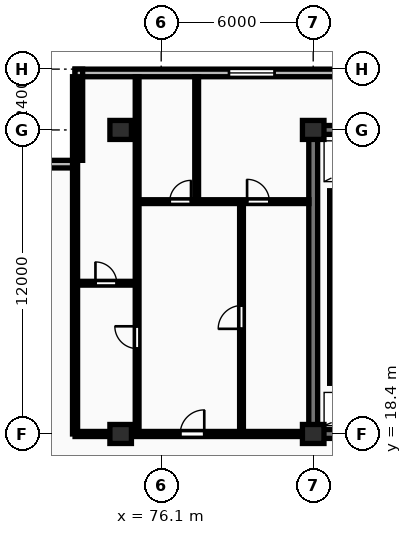
"""IFC4 building model, lengths in metres.
Left out: names, types, materials, properties, quantities, classifications, styles, units other than length and angle.
Written with IfcOpenShell. Run it as: python <this file> out.ifc"""

import sys

from ifc_helpers import new_model, si_unit, direction, frame, frame_2d, origin, origin_2d, place, context, subcontext, project, spatial, rectangle, extrude, element, fill, save


model = new_model("IFC4")
c1 = context("Model", 3, precision=1e-05, world=origin(), true_north=direction((0.0, 1.0)))
c2 = subcontext(c1, "Body", "Model", "MODEL_VIEW")
j1 = project(units=[si_unit("LENGTHUNIT", "METRE"), si_unit("PLANEANGLEUNIT", "RADIAN")], contexts=[c1])
p1 = place(None, origin())
s1 = spatial("IfcSite", under=j1, at=p1, CompositionType="ELEMENT")
p2 = place(p1, origin())
s2 = spatial("IfcBuilding", under=s1, at=p2, CompositionType="ELEMENT")
p3 = place(p2, frame((0.0, 0.0, 100.3)))
s3 = spatial("IfcBuildingStorey", under=s2, at=p3, CompositionType="ELEMENT", Elevation=100.3)
for number, where, z_axis, x_axis in (
    (1, (74.5, 18.4, 0.0), (0.0, 0.0, 1.0), (1.0, 0.0, 0.0)),
    (2, (74.5, 30.4, 0.0), (0.0, 0.0, 1.0), (1.0, 0.0, 0.0)),
    (3, (82.1, 18.4, 0.0), (0.0, 0.0, 1.0), (1.0, 0.0, 0.0)),
    (4, (82.1, 30.4, 0.0), (0.0, 0.0, 1.0), (1.0, 0.0, 0.0)),
):
    element("IfcColumn", number, at=place(p3, frame(where, z_axis=z_axis, x_axis=x_axis)), inside=s3, PredefinedType="COLUMN", context=c2, shape_type="SweptSolid", body=[
        extrude(rectangle(XDim=0.85, YDim=0.75, at=origin_2d()), origin(), (0.0, 0.0, 1.0), 3.25),
    ])
p4 = place(p3, frame((130.7, 32.65, 0.0), z_axis=(0.0, 0.0, 1.0), x_axis=(-1.0, 0.0, 0.0)))
e5 = element("IfcWall", 5, at=p4, inside=s3, PredefinedType="STANDARD", context=c2, shape_type="SweptSolid", body=[
    extrude(rectangle(XDim=58.0, YDim=0.3, at=frame_2d((29.0, 0.0))), origin(), (0.0, 0.0, 1.0), 2.97),
])
p5 = place(p4, frame((50.125, 0.0, 0.85)))
e6 = element("IfcOpeningElement", 6, at=p5, cuts=e5, PredefinedType="OPENING", context=c2, shape_type="SweptSolid", body=[
    extrude(rectangle(XDim=1.8, YDim=1.8, at=frame_2d((0.9, 0.9))), frame((0.0, 0.16, 0.0), z_axis=(0.0, -1.0, 0.0), x_axis=(1.0, 0.0, 0.0)), (0.0, 0.0, 1.0), 0.32),
])
p6 = place(p4, frame((6.775, 0.0, 0.85)))
e7 = element("IfcOpeningElement", 7, at=p6, cuts=e5, PredefinedType="OPENING", context=c2, shape_type="SweptSolid", body=[
    extrude(rectangle(XDim=1.8, YDim=1.8, at=frame_2d((0.9, 0.9))), frame((0.0, 0.16, 0.0), z_axis=(0.0, -1.0, 0.0), x_axis=(1.0, 0.0, 0.0)), (0.0, 0.0, 1.0), 0.32),
])
p7 = place(p3, frame((72.85, 32.8, 0.0), z_axis=(0.0, 0.0, 1.0), x_axis=(0.0, -1.0, 0.0)))
e8 = element("IfcWall", 8, at=p7, inside=s3, PredefinedType="STANDARD", context=c2, shape_type="SweptSolid", body=[
    extrude(rectangle(XDim=3.6, YDim=0.3, at=frame_2d((1.8, 0.0))), origin(), (0.0, 0.0, 1.0), 2.97),
])
p8 = place(p3, frame((72.7, 29.05, 0.0), z_axis=(0.0, 0.0, 1.0), x_axis=(-1.0, 0.0, 0.0)))
e9 = element("IfcWall", 9, at=p8, inside=s3, PredefinedType="STANDARD", context=c2, shape_type="SweptSolid", body=[
    extrude(rectangle(XDim=3.6, YDim=0.3, at=frame_2d((1.8, 0.0))), origin(), (0.0, 0.0, 1.0), 2.97),
])
p9 = place(p3, frame((81.925, 30.4, 0.0), z_axis=(0.0, 0.0, 1.0), x_axis=(1.0, 0.0, 0.0)))
e10 = element("IfcWall", 10, at=p9, inside=s3, PredefinedType="SHEAR", context=c2, shape_type="SweptSolid", body=[
    extrude(rectangle(XDim=36.265, YDim=0.35, at=frame_2d((18.132, 0.0))), origin(), (0.0, 0.0, 1.0), 3.25),
])
p10 = place(p3, frame((82.1, 18.575, 0.0), z_axis=(0.0, 0.0, 1.0), x_axis=(0.0, 1.0, 0.0)))
e11 = element("IfcWall", 11, at=p10, inside=s3, PredefinedType="SHEAR", context=c2, shape_type="SweptSolid", body=[
    extrude(rectangle(XDim=11.65, YDim=0.35, at=frame_2d((5.825, 0.0))), origin(), (0.0, 0.0, 1.0), 3.25),
])
p11 = place(p3, frame((81.925, 18.4, 0.0), z_axis=(0.0, 0.0, 1.0), x_axis=(1.0, 0.0, 0.0)))
e12 = element("IfcWall", 12, at=p11, inside=s3, PredefinedType="SHEAR", context=c2, shape_type="SweptSolid", body=[
    extrude(rectangle(XDim=36.265, YDim=0.35, at=frame_2d((18.132, 0.0))), origin(), (0.0, 0.0, 1.0), 3.25),
])
p12 = place(p11, frame((5.675, 0.0, 0.0)))
e13 = element("IfcOpeningElement", 13, at=p12, cuts=e12, PredefinedType="OPENING", context=c2, shape_type="SweptSolid", body=[
    extrude(rectangle(XDim=1.0, YDim=2.15, at=frame_2d((0.5, 1.075))), frame((0.0, 0.185, 0.0), z_axis=(0.0, -1.0, 0.0), x_axis=(1.0, 0.0, 0.0)), (0.0, 0.0, 1.0), 0.37),
])
p13 = place(p11, frame((21.925, 0.0, 0.0)))
e14 = element("IfcOpeningElement", 14, at=p13, cuts=e12, PredefinedType="OPENING", context=c2, shape_type="SweptSolid", body=[
    extrude(rectangle(XDim=1.5, YDim=2.2, at=frame_2d((0.75, 1.1))), frame((0.0, 0.185, 0.0), z_axis=(0.0, -1.0, 0.0), x_axis=(1.0, 0.0, 0.0)), (0.0, 0.0, 1.0), 0.37),
])
p14 = place(p11, frame((29.875, 0.0, 0.0)))
e15 = element("IfcOpeningElement", 15, at=p14, cuts=e12, PredefinedType="OPENING", context=c2, shape_type="SweptSolid", body=[
    extrude(rectangle(XDim=1.0, YDim=2.15, at=frame_2d((0.5, 1.075))), frame((0.0, 0.185, 0.0), z_axis=(0.0, -1.0, 0.0), x_axis=(1.0, 0.0, 0.0)), (0.0, 0.0, 1.0), 0.37),
])
p15 = place(p3, frame((82.875, 20.4, 0.0), z_axis=(0.0, 0.0, 1.0), x_axis=(0.0, 1.0, 0.0)))
e16 = element("IfcWall", 16, at=p15, inside=s3, PredefinedType="SHEAR", context=c2, shape_type="SweptSolid", body=[
    extrude(rectangle(XDim=7.6, YDim=0.25, at=frame_2d((3.8, 0.0))), origin(), (0.0, 0.0, 1.0), 3.25),
])
p16 = place(p3, frame((72.7, 18.4, 0.0), z_axis=(0.0, 0.0, 1.0), x_axis=(0.0, 1.0, 0.0)))
e17 = element("IfcWall", 17, at=p16, inside=s3, PredefinedType="PARTITIONING", context=c2, shape_type="SweptSolid", body=[
    extrude(rectangle(XDim=14.1, YDim=0.2, at=frame_2d((7.05, 0.0))), origin(), (0.0, 0.0, 1.0), 2.97),
])
p17 = place(p3, frame((72.7, 24.35, 0.0), z_axis=(0.0, 0.0, 1.0), x_axis=(1.0, 0.0, 0.0)))
e18 = element("IfcWall", 18, at=p17, inside=s3, PredefinedType="PARTITIONING", context=c2, shape_type="SweptSolid", body=[
    extrude(rectangle(XDim=2.45, YDim=0.15, at=frame_2d((1.225, 0.0))), origin(), (0.0, 0.0, 1.0), 2.97),
])
p18 = place(p17, frame((0.805, 0.0, 0.0)))
e19 = element("IfcOpeningElement", 19, at=p18, cuts=e18, PredefinedType="OPENING", context=c2, shape_type="SweptSolid", body=[
    extrude(rectangle(XDim=0.84, YDim=2.04, at=frame_2d((0.42, 1.02))), frame((0.0, 0.085, 0.0), z_axis=(0.0, -1.0, 0.0), x_axis=(1.0, 0.0, 0.0)), (0.0, 0.0, 1.0), 0.17),
])
p19 = place(p3, frame((75.15, 18.45, 0.0), z_axis=(0.0, 0.0, 1.0), x_axis=(0.0, 1.0, 0.0)))
e20 = element("IfcWall", 20, at=p19, inside=s3, PredefinedType="PARTITIONING", context=c2, shape_type="SweptSolid", body=[
    extrude(rectangle(XDim=14.05, YDim=0.15, at=frame_2d((7.025, 0.0))), origin(), (0.0, 0.0, 1.0), 2.97),
])
p20 = place(p19, frame((3.32, 0.0, 0.0)))
e21 = element("IfcOpeningElement", 21, at=p20, cuts=e20, PredefinedType="OPENING", context=c2, shape_type="SweptSolid", body=[
    extrude(rectangle(XDim=0.88, YDim=2.06, at=frame_2d((0.44, 1.03))), frame((0.0, 0.085, 0.0), z_axis=(0.0, -1.0, 0.0), x_axis=(1.0, 0.0, 0.0)), (0.0, 0.0, 1.0), 0.17),
])
p21 = place(p3, frame((79.27, 18.45, 0.0), z_axis=(0.0, 0.0, 1.0), x_axis=(0.0, 1.0, 0.0)))
e22 = element("IfcWall", 22, at=p21, inside=s3, PredefinedType="PARTITIONING", context=c2, shape_type="SweptSolid", body=[
    extrude(rectangle(XDim=9.12, YDim=0.15, at=frame_2d((4.56, 0.0))), origin(), (0.0, 0.0, 1.0), 2.97),
])
p22 = place(p21, frame((4.1, 0.0, 0.0)))
e23 = element("IfcOpeningElement", 23, at=p22, cuts=e22, PredefinedType="OPENING", context=c2, shape_type="SweptSolid", body=[
    extrude(rectangle(XDim=0.92, YDim=2.08, at=frame_2d((0.46, 1.04))), frame((0.0, 0.085, 0.0), z_axis=(0.0, -1.0, 0.0), x_axis=(1.0, 0.0, 0.0)), (0.0, 0.0, 1.0), 0.17),
])
p23 = place(p3, frame((77.5, 27.57, 0.0), z_axis=(0.0, 0.0, 1.0), x_axis=(0.0, 1.0, 0.0)))
e24 = element("IfcWall", 24, at=p23, inside=s3, PredefinedType="PARTITIONING", context=c2, shape_type="SweptSolid", body=[
    extrude(rectangle(XDim=4.93, YDim=0.15, at=frame_2d((2.465, 0.0))), origin(), (0.0, 0.0, 1.0), 2.97),
])
p24 = place(p3, frame((75.17, 27.57, 0.0), z_axis=(0.0, 0.0, 1.0), x_axis=(1.0, 0.0, 0.0)))
e25 = element("IfcWall", 25, at=p24, inside=s3, PredefinedType="PARTITIONING", context=c2, shape_type="SweptSolid", body=[
    extrude(rectangle(XDim=6.76, YDim=0.15, at=frame_2d((3.38, 0.0))), origin(), (0.0, 0.0, 1.0), 2.97),
])
p25 = place(p24, frame((1.266, 0.0, 0.0)))
e26 = element("IfcOpeningElement", 26, at=p25, cuts=e25, PredefinedType="OPENING", context=c2, shape_type="SweptSolid", body=[
    extrude(rectangle(XDim=0.84, YDim=2.04, at=frame_2d((0.42, 1.02))), frame((0.0, 0.085, 0.0), z_axis=(0.0, -1.0, 0.0), x_axis=(1.0, 0.0, 0.0)), (0.0, 0.0, 1.0), 0.17),
])
p26 = place(p24, frame((4.32, 0.0, 0.0)))
e27 = element("IfcOpeningElement", 27, at=p26, cuts=e25, PredefinedType="OPENING", context=c2, shape_type="SweptSolid", body=[
    extrude(rectangle(XDim=0.88, YDim=2.06, at=frame_2d((0.44, 1.03))), frame((0.0, 0.085, 0.0), z_axis=(0.0, -1.0, 0.0), x_axis=(1.0, 0.0, 0.0)), (0.0, 0.0, 1.0), 0.17),
])
p27 = place(p3, frame((72.7, 18.4, 0.0), z_axis=(0.0, 0.0, 1.0), x_axis=(1.0, 0.0, 0.0)))
e28 = element("IfcWall", 28, at=p27, inside=s3, PredefinedType="PARTITIONING", context=c2, shape_type="SweptSolid", body=[
    extrude(rectangle(XDim=9.25, YDim=0.2, at=frame_2d((4.625, 0.0))), origin(), (0.0, 0.0, 1.0), 2.358),
])
p28 = place(p27, frame((4.15, 0.0, 0.0)))
e29 = element("IfcOpeningElement", 29, at=p28, cuts=e28, PredefinedType="OPENING", context=c2, shape_type="SweptSolid", body=[
    extrude(rectangle(XDim=0.95, YDim=2.15, at=frame_2d((0.475, 1.075))), frame((0.0, 0.11, 0.0), z_axis=(0.0, -1.0, 0.0), x_axis=(1.0, 0.0, 0.0)), (0.0, 0.0, 1.0), 0.22),
])
p29 = place(p5, origin())
e30 = element("IfcWindow", 30, at=p29, inside=s3, PartitioningType="SINGLE_PANEL", PredefinedType="WINDOW", context=c2, shape_type="SweptSolid", body=[
    extrude(rectangle(XDim=1.8, YDim=1.8, at=frame_2d((0.9, 0.9))), frame((0.0, 0.03, 0.0), z_axis=(0.0, -1.0, 0.0), x_axis=(1.0, 0.0, 0.0)), (0.0, 0.0, 1.0), 0.06),
])
fill(e6, e30)
p30 = place(p18, origin())
e31 = element("IfcDoor", 31, at=p30, inside=s3, OperationType="SINGLE_SWING_LEFT", PredefinedType="DOOR", context=c2, shape_type="SweptSolid", body=[
    extrude(rectangle(XDim=0.84, YDim=2.04, at=frame_2d((0.42, 1.02))), frame((0.0, 0.025, 0.0), z_axis=(0.0, -1.0, 0.0), x_axis=(1.0, 0.0, 0.0)), (0.0, 0.0, 1.0), 0.05),
])
fill(e19, e31)
p31 = place(p20, origin())
e32 = element("IfcDoor", 32, at=p31, inside=s3, OperationType="SINGLE_SWING_RIGHT", PredefinedType="DOOR", context=c2, shape_type="SweptSolid", body=[
    extrude(rectangle(XDim=0.88, YDim=2.06, at=frame_2d((0.44, 1.03))), frame((0.0, 0.025, 0.0), z_axis=(0.0, -1.0, 0.0), x_axis=(1.0, 0.0, 0.0)), (0.0, 0.0, 1.0), 0.05),
])
fill(e21, e32)
p32 = place(p22, origin())
e33 = element("IfcDoor", 33, at=p32, inside=s3, OperationType="SINGLE_SWING_LEFT", PredefinedType="DOOR", context=c2, shape_type="SweptSolid", body=[
    extrude(rectangle(XDim=0.92, YDim=2.08, at=frame_2d((0.46, 1.04))), frame((0.0, 0.025, 0.0), z_axis=(0.0, -1.0, 0.0), x_axis=(1.0, 0.0, 0.0)), (0.0, 0.0, 1.0), 0.05),
])
fill(e23, e33)
p33 = place(p25, origin())
e34 = element("IfcDoor", 34, at=p33, inside=s3, OperationType="SINGLE_SWING_RIGHT", PredefinedType="DOOR", context=c2, shape_type="SweptSolid", body=[
    extrude(rectangle(XDim=0.84, YDim=2.04, at=frame_2d((0.42, 1.02))), frame((0.0, 0.025, 0.0), z_axis=(0.0, -1.0, 0.0), x_axis=(1.0, 0.0, 0.0)), (0.0, 0.0, 1.0), 0.05),
])
fill(e26, e34)
p34 = place(p26, origin())
e35 = element("IfcDoor", 35, at=p34, inside=s3, OperationType="SINGLE_SWING_LEFT", PredefinedType="DOOR", context=c2, shape_type="SweptSolid", body=[
    extrude(rectangle(XDim=0.88, YDim=2.06, at=frame_2d((0.44, 1.03))), frame((0.0, 0.025, 0.0), z_axis=(0.0, -1.0, 0.0), x_axis=(1.0, 0.0, 0.0)), (0.0, 0.0, 1.0), 0.05),
])
fill(e27, e35)
p35 = place(p28, origin())
e36 = element("IfcDoor", 36, at=p35, inside=s3, OperationType="SINGLE_SWING_RIGHT", PredefinedType="DOOR", context=c2, shape_type="SweptSolid", body=[
    extrude(rectangle(XDim=0.95, YDim=2.15, at=frame_2d((0.475, 1.075))), frame((0.0, 0.025, 0.0), z_axis=(0.0, -1.0, 0.0), x_axis=(1.0, 0.0, 0.0)), (0.0, 0.0, 1.0), 0.05),
])
fill(e29, e36)
save(model, sys.argv[1])
